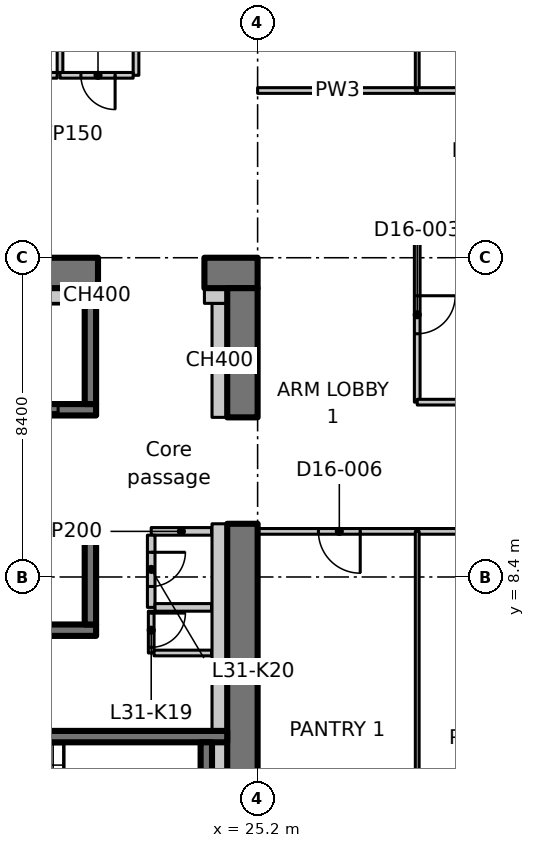
"""IFC4 building model, lengths in metres.
Left out: names, types, materials, properties, quantities, classifications, styles, units other than length and angle.
Written with IfcOpenShell. Run it as: python <this file> out.ifc"""

import sys

from ifc_helpers import new_model, si_unit, direction, frame, frame_2d, origin, place, context, subcontext, project, spatial, polyline, rectangle, outline, extrude, element, fill, save


model = new_model("IFC4")
c1 = context("Model", 3, precision=1e-05, world=origin(), true_north=direction((0.0, 1.0)))
c2 = subcontext(c1, "Body", "Model", "MODEL_VIEW")
j1 = project(units=[si_unit("LENGTHUNIT", "METRE"), si_unit("PLANEANGLEUNIT", "RADIAN")], contexts=[c1])
p1 = place(None, origin())
s1 = spatial("IfcSite", under=j1, at=p1, CompositionType="ELEMENT")
p2 = place(p1, origin())
s2 = spatial("IfcBuilding", under=s1, at=p2, CompositionType="ELEMENT")
p3 = place(p2, frame((0.0, 0.0, 127.7)))
s3 = spatial("IfcBuildingStorey", under=s2, at=p3, CompositionType="ELEMENT", Elevation=127.7)
p4 = place(p3, frame((-1.1, 16.4, 0.0), z_axis=(0.0, 0.0, 1.0), x_axis=(1.0, 0.0, 0.0)))
e1 = element("IfcWall", 1, at=p4, inside=s3, PredefinedType="SHEAR", context=c2, shape_type="SweptSolid", body=[
    extrude(rectangle(XDim=22.1, YDim=0.8, at=frame_2d((11.05, 0.0))), origin(), (0.0, 0.0, 1.0), 3.35),
])
p5 = place(p4, frame((3.15, 0.0, 0.0)))
e2 = element("IfcOpeningElement", 2, at=p5, cuts=e1, PredefinedType="OPENING", context=c2, shape_type="SweptSolid", body=[
    extrude(rectangle(XDim=1.1, YDim=2.3, at=frame_2d((0.55, 1.15))), frame((0.0, 0.41, 0.0), z_axis=(0.0, -1.0, 0.0), x_axis=(1.0, 0.0, 0.0)), (0.0, 0.0, 1.0), 0.82),
])
p6 = place(p3, frame((23.8, 16.4, 0.0), z_axis=(0.0, 0.0, 1.0), x_axis=(1.0, 0.0, 0.0)))
e3 = element("IfcWall", 3, at=p6, inside=s3, PredefinedType="SHEAR", context=c2, shape_type="SweptSolid", body=[
    extrude(rectangle(XDim=1.4, YDim=0.8, at=frame_2d((0.7, 0.0))), origin(), (0.0, 0.0, 1.0), 3.35),
])
p7 = place(p3, frame((24.8, 0.8, 0.0), z_axis=(0.0, 0.0, 1.0), x_axis=(0.0, 1.0, 0.0)))
e4 = element("IfcWall", 4, at=p7, inside=s3, PredefinedType="SHEAR", context=c2, shape_type="SweptSolid", body=[
    extrude(rectangle(XDim=9.0, YDim=0.8, at=frame_2d((4.5, 0.0))), origin(), (0.0, 0.0, 1.0), 3.35),
])
p8 = place(p3, frame((24.8, 12.6, 0.0), z_axis=(0.0, 0.0, 1.0), x_axis=(0.0, 1.0, 0.0)))
e5 = element("IfcWall", 5, at=p8, inside=s3, PredefinedType="SHEAR", context=c2, shape_type="SweptSolid", body=[
    extrude(rectangle(XDim=3.4, YDim=0.8, at=frame_2d((1.7, 0.0))), origin(), (0.0, 0.0, 1.0), 3.35),
])
p9 = place(p3, frame((24.2, 12.6, 0.0), z_axis=(0.0, 0.0, 1.0), x_axis=(0.0, 1.0, 0.0)))
e6 = element("IfcWall", 6, at=p9, inside=s3, PredefinedType="PARTITIONING", context=c2, shape_type="SweptSolid", body=[
    extrude(rectangle(XDim=3.0, YDim=0.4, at=frame_2d((1.5, 0.0))), origin(), (0.0, 0.0, 1.0), 3.35),
])
p10 = place(p3, frame((23.8, 15.8, 0.0), z_axis=(0.0, 0.0, 1.0), x_axis=(1.0, 0.0, 0.0)))
e7 = element("IfcWall", 7, at=p10, inside=s3, PredefinedType="PARTITIONING", context=c2, shape_type="SweptSolid", body=[
    extrude(rectangle(XDim=0.6, YDim=0.4, at=frame_2d((0.3, 0.0))), origin(), (0.0, 0.0, 1.0), 3.35),
])
p11 = place(p3, frame((0.8, 7.0, 0.0), z_axis=(0.0, 0.0, 1.0), x_axis=(1.0, 0.0, 0.0)))
e8 = element("IfcWall", 8, at=p11, inside=s3, PredefinedType="SHEAR", context=c2, shape_type="SweptSolid", body=[
    extrude(rectangle(XDim=20.15, YDim=0.3, at=frame_2d((10.075, 0.0))), origin(), (0.0, 0.0, 1.0), 3.35),
])
p12 = place(p3, frame((0.8, 9.6, 0.0), z_axis=(0.0, 0.0, 1.0), x_axis=(1.0, 0.0, 0.0)))
e9 = element("IfcWall", 9, at=p12, inside=s3, PredefinedType="SHEAR", context=c2, shape_type="SweptSolid", body=[
    extrude(rectangle(XDim=20.15, YDim=0.3, at=frame_2d((10.075, 0.0))), origin(), (0.0, 0.0, 1.0), 3.35),
])
p13 = place(p12, frame((1.25, 0.0, 0.0)))
e10 = element("IfcOpeningElement", 10, at=p13, cuts=e9, PredefinedType="OPENING", context=c2, shape_type="SweptSolid", body=[
    extrude(rectangle(XDim=1.1, YDim=2.3, at=frame_2d((0.55, 1.15))), frame((0.0, 0.16, 0.0), z_axis=(0.0, -1.0, 0.0), x_axis=(1.0, 0.0, 0.0)), (0.0, 0.0, 1.0), 0.32),
])
p14 = place(p12, frame((4.05, 0.0, 0.0)))
e11 = element("IfcOpeningElement", 11, at=p14, cuts=e9, PredefinedType="OPENING", context=c2, shape_type="SweptSolid", body=[
    extrude(rectangle(XDim=1.1, YDim=2.3, at=frame_2d((0.55, 1.15))), frame((0.0, 0.16, 0.0), z_axis=(0.0, -1.0, 0.0), x_axis=(1.0, 0.0, 0.0)), (0.0, 0.0, 1.0), 0.32),
])
p15 = place(p12, frame((6.85, 0.0, 0.0)))
e12 = element("IfcOpeningElement", 12, at=p15, cuts=e9, PredefinedType="OPENING", context=c2, shape_type="SweptSolid", body=[
    extrude(rectangle(XDim=1.1, YDim=2.3, at=frame_2d((0.55, 1.15))), frame((0.0, 0.16, 0.0), z_axis=(0.0, -1.0, 0.0), x_axis=(1.0, 0.0, 0.0)), (0.0, 0.0, 1.0), 0.32),
])
p16 = place(p12, frame((9.65, 0.0, 0.0)))
e13 = element("IfcOpeningElement", 13, at=p16, cuts=e9, PredefinedType="OPENING", context=c2, shape_type="SweptSolid", body=[
    extrude(rectangle(XDim=1.1, YDim=2.3, at=frame_2d((0.55, 1.15))), frame((0.0, 0.16, 0.0), z_axis=(0.0, -1.0, 0.0), x_axis=(1.0, 0.0, 0.0)), (0.0, 0.0, 1.0), 0.32),
])
p17 = place(p12, frame((12.45, 0.0, 0.0)))
e14 = element("IfcOpeningElement", 14, at=p17, cuts=e9, PredefinedType="OPENING", context=c2, shape_type="SweptSolid", body=[
    extrude(rectangle(XDim=1.1, YDim=2.3, at=frame_2d((0.55, 1.15))), frame((0.0, 0.16, 0.0), z_axis=(0.0, -1.0, 0.0), x_axis=(1.0, 0.0, 0.0)), (0.0, 0.0, 1.0), 0.32),
])
p18 = place(p12, frame((15.25, 0.0, 0.0)))
e15 = element("IfcOpeningElement", 15, at=p18, cuts=e9, PredefinedType="OPENING", context=c2, shape_type="SweptSolid", body=[
    extrude(rectangle(XDim=1.1, YDim=2.3, at=frame_2d((0.55, 1.15))), frame((0.0, 0.16, 0.0), z_axis=(0.0, -1.0, 0.0), x_axis=(1.0, 0.0, 0.0)), (0.0, 0.0, 1.0), 0.32),
])
p19 = place(p3, frame((20.8, 7.15, 0.0), z_axis=(0.0, 0.0, 1.0), x_axis=(0.0, 1.0, 0.0)))
e16 = element("IfcWall", 16, at=p19, inside=s3, PredefinedType="SHEAR", context=c2, shape_type="SweptSolid", body=[
    extrude(rectangle(XDim=2.3, YDim=0.3, at=frame_2d((1.15, 0.0))), origin(), (0.0, 0.0, 1.0), 3.35),
])
p20 = place(p3, frame((15.05, 12.8, 0.0), z_axis=(0.0, 0.0, 1.0), x_axis=(1.0, 0.0, 0.0)))
e17 = element("IfcWall", 17, at=p20, inside=s3, PredefinedType="SHEAR", context=c2, shape_type="SweptSolid", body=[
    extrude(rectangle(XDim=5.9, YDim=0.3, at=frame_2d((2.95, 0.0))), origin(), (0.0, 0.0, 1.0), 3.35),
])
p21 = place(p20, frame((3.8, 0.0, 0.0)))
e18 = element("IfcOpeningElement", 18, at=p21, cuts=e17, PredefinedType="OPENING", context=c2, shape_type="SweptSolid", body=[
    extrude(rectangle(XDim=1.1, YDim=2.3, at=frame_2d((0.55, 1.15))), frame((0.0, 0.16, 0.0), z_axis=(0.0, -1.0, 0.0), x_axis=(1.0, 0.0, 0.0)), (0.0, 0.0, 1.0), 0.32),
])
p22 = place(p3, frame((20.8, 12.95, 0.0), z_axis=(0.0, 0.0, 1.0), x_axis=(0.0, 1.0, 0.0)))
e19 = element("IfcWall", 19, at=p22, inside=s3, PredefinedType="SHEAR", context=c2, shape_type="SweptSolid", body=[
    extrude(rectangle(XDim=3.05, YDim=0.3, at=frame_2d((1.525, 0.0))), origin(), (0.0, 0.0, 1.0), 3.35),
])
p23 = place(p3, frame((15.8, 4.2, 0.0), z_axis=(0.0, 0.0, 1.0), x_axis=(1.0, 0.0, 0.0)))
e20 = element("IfcWall", 20, at=p23, inside=s3, PredefinedType="SHEAR", context=c2, shape_type="SweptSolid", body=[
    extrude(rectangle(XDim=8.6, YDim=0.3, at=frame_2d((4.3, 0.0))), origin(), (0.0, 0.0, 1.0), 3.35),
])
p24 = place(p23, frame((0.4, 0.0, 0.0)))
e21 = element("IfcOpeningElement", 21, at=p24, cuts=e20, PredefinedType="OPENING", context=c2, shape_type="SweptSolid", body=[
    extrude(rectangle(XDim=1.0, YDim=2.1, at=frame_2d((0.5, 1.05))), frame((0.0, 0.16, 0.0), z_axis=(0.0, -1.0, 0.0), x_axis=(1.0, 0.0, 0.0)), (0.0, 0.0, 1.0), 0.32),
])
p25 = place(p3, frame((23.85, 1.5, 0.0), z_axis=(0.0, 0.0, 1.0), x_axis=(0.0, 1.0, 0.0)))
e22 = element("IfcWall", 22, at=p25, inside=s3, PredefinedType="SHEAR", context=c2, shape_type="SweptSolid", body=[
    extrude(rectangle(XDim=2.55, YDim=0.3, at=frame_2d((1.275, 0.0))), origin(), (0.0, 0.0, 1.0), 3.35),
])
p26 = place(p3, frame((23.988, 9.6, 0.0), z_axis=(0.0, 0.0, 1.0), x_axis=(-1.0, 0.0, 0.0)))
e23 = element("IfcWall", 23, at=p26, inside=s3, PredefinedType="PARTITIONING", context=c2, shape_type="SweptSolid", body=[
    extrude(rectangle(XDim=1.588, YDim=0.2, at=frame_2d((0.794, 0.0))), origin(), (0.0, 0.0, 1.0), 3.35),
])
p27 = place(p3, frame((22.4, 9.5, 0.0), z_axis=(0.0, 0.0, 1.0), x_axis=(0.0, -1.0, 0.0)))
e24 = element("IfcWall", 24, at=p27, inside=s3, PredefinedType="PARTITIONING", context=c2, shape_type="SweptSolid", body=[
    extrude(rectangle(XDim=1.9, YDim=0.2, at=frame_2d((0.95, 0.0))), origin(), (0.0, 0.0, 1.0), 3.35),
])
p28 = place(p27, frame((0.45, 0.0, 0.0)))
e25 = element("IfcOpeningElement", 25, at=p28, cuts=e24, PredefinedType="OPENING", context=c2, shape_type="SweptSolid", body=[
    extrude(rectangle(XDim=0.9, YDim=2.1, at=frame_2d((0.45, 1.05))), frame((0.0, 0.11, 0.0), z_axis=(0.0, -1.0, 0.0), x_axis=(1.0, 0.0, 0.0)), (0.0, 0.0, 1.0), 0.22),
])
p29 = place(p3, frame((22.5, 7.6, 0.0), z_axis=(0.0, 0.0, 1.0), x_axis=(1.0, 0.0, 0.0)))
e26 = element("IfcWall", 26, at=p29, inside=s3, PredefinedType="PARTITIONING", context=c2, shape_type="SweptSolid", body=[
    extrude(rectangle(XDim=1.488, YDim=0.2, at=frame_2d((0.744, 0.0))), origin(), (0.0, 0.0, 1.0), 3.35),
])
p30 = place(p3, frame((22.0, 23.925, 0.0), z_axis=(0.0, 0.0, 1.0), x_axis=(0.0, -1.0, 0.0)))
e27 = element("IfcWall", 27, at=p30, inside=s3, PredefinedType="PARTITIONING", context=c2, shape_type="SweptSolid", body=[
    extrude(rectangle(XDim=2.325, YDim=0.15, at=frame_2d((1.163, 0.0))), origin(), (0.0, 0.0, 1.0), 3.35),
])
p31 = place(p3, frame((21.925, 21.6, 0.0), z_axis=(0.0, 0.0, 1.0), x_axis=(-1.0, 0.0, 0.0)))
e28 = element("IfcWall", 28, at=p31, inside=s3, PredefinedType="PARTITIONING", context=c2, shape_type="SweptSolid", body=[
    extrude(rectangle(XDim=1.925, YDim=0.15, at=frame_2d((0.962, 0.0))), origin(), (0.0, 0.0, 1.0), 3.35),
])
p32 = place(p31, frame((0.475, 0.0, 0.0)))
e29 = element("IfcOpeningElement", 29, at=p32, cuts=e28, PredefinedType="OPENING", context=c2, shape_type="SweptSolid", body=[
    extrude(rectangle(XDim=0.9, YDim=2.1, at=frame_2d((0.45, 1.05))), frame((0.0, 0.085, 0.0), z_axis=(0.0, -1.0, 0.0), x_axis=(1.0, 0.0, 0.0)), (0.0, 0.0, 1.0), 0.17),
])
p33 = place(p3, frame((20.0, 21.675, 0.0), z_axis=(0.0, 0.0, 1.0), x_axis=(0.0, 1.0, 0.0)))
e30 = element("IfcWall", 30, at=p33, inside=s3, PredefinedType="PARTITIONING", context=c2, shape_type="SweptSolid", body=[
    extrude(rectangle(XDim=2.25, YDim=0.15, at=frame_2d((1.125, 0.0))), origin(), (0.0, 0.0, 1.0), 3.35),
])
p34 = place(p3, frame((19.925, 21.6, 0.0), z_axis=(0.0, 0.0, 1.0), x_axis=(-1.0, 0.0, 0.0)))
e31 = element("IfcWall", 31, at=p34, inside=s3, PredefinedType="PARTITIONING", context=c2, shape_type="SweptSolid", body=[
    extrude(rectangle(XDim=2.325, YDim=0.15, at=frame_2d((1.163, 0.0))), origin(), (0.0, 0.0, 1.0), 3.35),
])
p35 = place(p34, frame((0.675, 0.0, 0.0)))
e32 = element("IfcOpeningElement", 32, at=p35, cuts=e31, PredefinedType="OPENING", context=c2, shape_type="SweptSolid", body=[
    extrude(rectangle(XDim=0.9, YDim=2.1, at=frame_2d((0.45, 1.05))), frame((0.0, 0.085, 0.0), z_axis=(0.0, -1.0, 0.0), x_axis=(1.0, 0.0, 0.0)), (0.0, 0.0, 1.0), 0.17),
])
p36 = place(p3, frame((22.4, 7.5, 0.0), z_axis=(0.0, 0.0, 1.0), x_axis=(0.0, -1.0, 0.0)))
e33 = element("IfcWall", 33, at=p36, inside=s3, PredefinedType="PARTITIONING", context=c2, shape_type="SweptSolid", body=[
    extrude(rectangle(XDim=1.1, YDim=0.15, at=frame_2d((0.55, 0.0))), origin(), (0.0, 0.0, 1.0), 3.35),
])
p37 = place(p36, frame((0.05, 0.0, 0.0)))
e34 = element("IfcOpeningElement", 34, at=p37, cuts=e33, PredefinedType="OPENING", context=c2, shape_type="SweptSolid", body=[
    extrude(rectangle(XDim=0.9, YDim=2.1, at=frame_2d((0.45, 1.05))), frame((0.0, 0.085, 0.0), z_axis=(0.0, -1.0, 0.0), x_axis=(1.0, 0.0, 0.0)), (0.0, 0.0, 1.0), 0.17),
])
p38 = place(p3, frame((22.475, 6.4, 0.0), z_axis=(0.0, 0.0, 1.0), x_axis=(1.0, 0.0, 0.0)))
e35 = element("IfcWall", 35, at=p38, inside=s3, PredefinedType="PARTITIONING", context=c2, shape_type="SweptSolid", body=[
    extrude(rectangle(XDim=1.513, YDim=0.15, at=frame_2d((0.756, 0.0))), origin(), (0.0, 0.0, 1.0), 3.35),
])
p39 = place(p3, frame((18.15, 15.8, 0.0), z_axis=(0.0, 0.0, 1.0), x_axis=(1.0, 0.0, 0.0)))
e36 = element("IfcWall", 36, at=p39, inside=s3, PredefinedType="PARTITIONING", context=c2, shape_type="SweptSolid", body=[
    extrude(rectangle(XDim=2.5, YDim=0.4, at=frame_2d((1.25, 0.0))), origin(), (0.0, 0.0, 1.0), 3.35),
])
p40 = place(p3, frame((20.95, 15.8, 0.0), z_axis=(0.0, 0.0, 1.0), x_axis=(1.0, 0.0, 0.0)))
e37 = element("IfcWall", 37, at=p40, inside=s3, PredefinedType="PARTITIONING", context=c2, shape_type="SweptSolid", body=[
    extrude(rectangle(XDim=0.05, YDim=0.4, at=frame_2d((0.025, 0.0))), origin(), (0.0, 0.0, 1.0), 3.35),
])
p41 = place(p3, frame((24.2, 1.5, 0.0), z_axis=(0.0, 0.0, 1.0), x_axis=(0.0, 1.0, 0.0)))
e38 = element("IfcWall", 38, at=p41, inside=s3, PredefinedType="PARTITIONING", context=c2, shape_type="SweptSolid", body=[
    extrude(rectangle(XDim=2.55, YDim=0.4, at=frame_2d((1.275, 0.0))), origin(), (0.0, 0.0, 1.0), 3.35),
])
p42 = place(p3, frame((24.2, 4.35, 0.0), z_axis=(0.0, 0.0, 1.0), x_axis=(0.0, 1.0, 0.0)))
e39 = element("IfcWall", 39, at=p42, inside=s3, PredefinedType="PARTITIONING", context=c2, shape_type="SweptSolid", body=[
    extrude(rectangle(XDim=5.45, YDim=0.4, at=frame_2d((2.725, 0.0))), origin(), (0.0, 0.0, 1.0), 3.35),
])
p43 = place(p3, frame((25.2, 21.2, 0.0), z_axis=(0.0, 0.0, 1.0), x_axis=(1.0, 0.0, 0.0)))
e40 = element("IfcWall", 40, at=p43, inside=s3, PredefinedType="PARTITIONING", context=c2, shape_type="SweptSolid", body=[
    extrude(rectangle(XDim=4.2, YDim=0.15, at=frame_2d((2.1, 0.0))), origin(), (0.0, 0.0, 1.0), 3.33),
])
p44 = place(p3, frame((29.4, 17.6, 0.0), z_axis=(0.0, 0.0, 1.0), x_axis=(0.0, -1.0, 0.0)))
e41 = element("IfcWall", 41, at=p44, inside=s3, PredefinedType="PARTITIONING", context=c2, shape_type="SweptSolid", body=[
    extrude(rectangle(XDim=4.6, YDim=0.15, at=frame_2d((2.3, 0.0))), origin(), (0.0, 0.0, 1.0), 3.33),
])
p45 = place(p44, frame((1.8, 0.0, 0.0)))
e42 = element("IfcOpeningElement", 42, at=p45, cuts=e41, PredefinedType="OPENING", context=c2, shape_type="SweptSolid", body=[
    extrude(rectangle(XDim=1.0, YDim=2.1, at=frame_2d((0.5, 1.05))), frame((0.0, 0.085, 0.0), z_axis=(0.0, -1.0, 0.0), x_axis=(1.0, 0.0, 0.0)), (0.0, 0.0, 1.0), 0.17),
])
p46 = place(p3, frame((29.4, 9.6, 0.0), z_axis=(0.0, 0.0, 1.0), x_axis=(-1.0, 0.0, 0.0)))
e43 = element("IfcWall", 43, at=p46, inside=s3, PredefinedType="PARTITIONING", context=c2, shape_type="SweptSolid", body=[
    extrude(rectangle(XDim=4.2, YDim=0.15, at=frame_2d((2.1, 0.0))), origin(), (0.0, 0.0, 1.0), 3.33),
])
p47 = place(p46, frame((1.5, 0.0, 0.0)))
e44 = element("IfcOpeningElement", 44, at=p47, cuts=e43, PredefinedType="OPENING", context=c2, shape_type="SweptSolid", body=[
    extrude(rectangle(XDim=1.1, YDim=2.1, at=frame_2d((0.55, 1.05))), frame((0.0, 0.085, 0.0), z_axis=(0.0, -1.0, 0.0), x_axis=(1.0, 0.0, 0.0)), (0.0, 0.0, 1.0), 0.17),
])
p48 = place(p3, frame((29.4, 27.511, 0.0), z_axis=(0.0, 0.0, 1.0), x_axis=(0.0, -1.0, 0.0)))
e45 = element("IfcWall", 45, at=p48, inside=s3, PredefinedType="PARTITIONING", context=c2, shape_type="SweptSolid", body=[
    extrude(outline(polyline([(0.0, 0.0), (6.311, 0.0), (6.311, 3.33), (2.761, 3.33), (2.759, 2.98), (1.863, 2.98), (1.861, 3.33), (0.236, 3.33), (0.0, 3.33), (0.0, 0.0)])), frame((0.0, 0.05, 0.0), z_axis=(0.0, -1.0, 0.0), x_axis=(1.0, 0.0, 0.0)), (0.0, 0.0, 1.0), 0.1),
])
p49 = place(p3, frame((29.4, 13.0, 0.0), z_axis=(0.0, 0.0, 1.0), x_axis=(1.0, 0.0, 0.0)))
e46 = element("IfcWall", 46, at=p49, inside=s3, PredefinedType="PARTITIONING", context=c2, shape_type="SweptSolid", body=[
    extrude(rectangle(XDim=4.2, YDim=0.15, at=frame_2d((2.1, 0.0))), origin(), (0.0, 0.0, 1.0), 3.33),
])
p50 = place(p3, frame((33.6, 9.6, 0.0), z_axis=(0.0, 0.0, 1.0), x_axis=(-1.0, 0.0, 0.0)))
e47 = element("IfcWall", 47, at=p50, inside=s3, PredefinedType="PARTITIONING", context=c2, shape_type="SweptSolid", body=[
    extrude(rectangle(XDim=4.2, YDim=0.15, at=frame_2d((2.1, 0.0))), origin(), (0.0, 0.0, 1.0), 3.33),
])
p51 = place(p50, frame((1.5, 0.0, 0.0)))
e48 = element("IfcOpeningElement", 48, at=p51, cuts=e47, PredefinedType="OPENING", context=c2, shape_type="SweptSolid", body=[
    extrude(rectangle(XDim=1.1, YDim=2.1, at=frame_2d((0.55, 1.05))), frame((0.0, 0.085, 0.0), z_axis=(0.0, -1.0, 0.0), x_axis=(1.0, 0.0, 0.0)), (0.0, 0.0, 1.0), 0.17),
])
p52 = place(p3, frame((33.6, 17.6, 0.0), z_axis=(0.0, 0.0, 1.0), x_axis=(-1.0, 0.0, 0.0)))
e49 = element("IfcWall", 49, at=p52, inside=s3, PredefinedType="PARTITIONING", context=c2, shape_type="SweptSolid", body=[
    extrude(rectangle(XDim=4.2, YDim=0.15, at=frame_2d((2.1, 0.0))), origin(), (0.0, 0.0, 1.0), 3.33),
])
p53 = place(p3, frame((29.4, 21.2, 0.0), z_axis=(0.0, 0.0, 1.0), x_axis=(1.0, 0.0, 0.0)))
e50 = element("IfcWall", 50, at=p53, inside=s3, PredefinedType="PARTITIONING", context=c2, shape_type="SweptSolid", body=[
    extrude(rectangle(XDim=4.2, YDim=0.15, at=frame_2d((2.1, 0.0))), origin(), (0.0, 0.0, 1.0), 3.33),
])
p54 = place(p53, frame((1.5, 0.0, 0.0)))
e51 = element("IfcOpeningElement", 51, at=p54, cuts=e50, PredefinedType="OPENING", context=c2, shape_type="SweptSolid", body=[
    extrude(rectangle(XDim=1.1, YDim=2.1, at=frame_2d((0.55, 1.05))), frame((0.0, 0.085, 0.0), z_axis=(0.0, -1.0, 0.0), x_axis=(1.0, 0.0, 0.0)), (0.0, 0.0, 1.0), 0.17),
])
p55 = place(p3, frame((29.4, 9.6, 0.0), z_axis=(0.0, 0.0, 1.0), x_axis=(0.0, -1.0, 0.0)))
e52 = element("IfcWall", 52, at=p55, inside=s3, PredefinedType="PARTITIONING", context=c2, shape_type="SweptSolid", body=[
    extrude(outline(polyline([(0.0, 0.0), (10.774, 0.0), (10.774, 3.33), (10.7, 3.33), (10.05, 3.33), (10.048, 2.98), (9.152, 2.98), (9.15, 3.33), (0.0, 3.33), (0.0, 0.0)])), frame((0.0, 0.05, 0.0), z_axis=(0.0, -1.0, 0.0), x_axis=(1.0, 0.0, 0.0)), (0.0, 0.0, 1.0), 0.1),
])
p56 = place(p21, origin())
e53 = element("IfcDoor", 53, at=p56, inside=s3, OperationType="SLIDING_TO_LEFT", PredefinedType="DOOR", context=c2, shape_type="SweptSolid", body=[
    extrude(rectangle(XDim=1.1, YDim=2.3, at=frame_2d((0.55, 1.15))), frame((0.0, 0.025, 0.0), z_axis=(0.0, -1.0, 0.0), x_axis=(1.0, 0.0, 0.0)), (0.0, 0.0, 1.0), 0.05),
])
fill(e18, e53)
p57 = place(p37, origin())
e54 = element("IfcDoor", 54, at=p57, inside=s3, OperationType="SINGLE_SWING_RIGHT", PredefinedType="DOOR", context=c2, shape_type="SweptSolid", body=[
    extrude(rectangle(XDim=0.9, YDim=2.1, at=frame_2d((0.45, 1.05))), frame((0.0, 0.025, 0.0), z_axis=(0.0, -1.0, 0.0), x_axis=(1.0, 0.0, 0.0)), (0.0, 0.0, 1.0), 0.05),
])
fill(e34, e54)
p58 = place(p28, origin())
e55 = element("IfcDoor", 55, at=p58, inside=s3, OperationType="SINGLE_SWING_LEFT", PredefinedType="DOOR", context=c2, shape_type="SweptSolid", body=[
    extrude(rectangle(XDim=0.9, YDim=2.1, at=frame_2d((0.45, 1.05))), frame((0.0, 0.025, 0.0), z_axis=(0.0, -1.0, 0.0), x_axis=(1.0, 0.0, 0.0)), (0.0, 0.0, 1.0), 0.05),
])
fill(e25, e55)
p59 = place(p32, origin())
e56 = element("IfcDoor", 56, at=p59, inside=s3, OperationType="SINGLE_SWING_LEFT", PredefinedType="DOOR", context=c2, shape_type="SweptSolid", body=[
    extrude(rectangle(XDim=0.9, YDim=2.1, at=frame_2d((0.45, 1.05))), frame((0.0, 0.025, 0.0), z_axis=(0.0, -1.0, 0.0), x_axis=(1.0, 0.0, 0.0)), (0.0, 0.0, 1.0), 0.05),
])
fill(e29, e56)
p60 = place(p45, origin())
e57 = element("IfcDoor", 57, at=p60, inside=s3, OperationType="SINGLE_SWING_LEFT", PredefinedType="DOOR", context=c2, shape_type="SweptSolid", body=[
    extrude(rectangle(XDim=1.0, YDim=2.1, at=frame_2d((0.5, 1.05))), frame((0.0, 0.025, 0.0), z_axis=(0.0, -1.0, 0.0), x_axis=(1.0, 0.0, 0.0)), (0.0, 0.0, 1.0), 0.05),
])
fill(e42, e57)
p61 = place(p47, origin())
e58 = element("IfcDoor", 58, at=p61, inside=s3, OperationType="SINGLE_SWING_LEFT", PredefinedType="DOOR", context=c2, shape_type="SweptSolid", body=[
    extrude(rectangle(XDim=1.1, YDim=2.1, at=frame_2d((0.55, 1.05))), frame((0.0, 0.025, 0.0), z_axis=(0.0, -1.0, 0.0), x_axis=(1.0, 0.0, 0.0)), (0.0, 0.0, 1.0), 0.05),
])
fill(e44, e58)
save(model, sys.argv[1])
